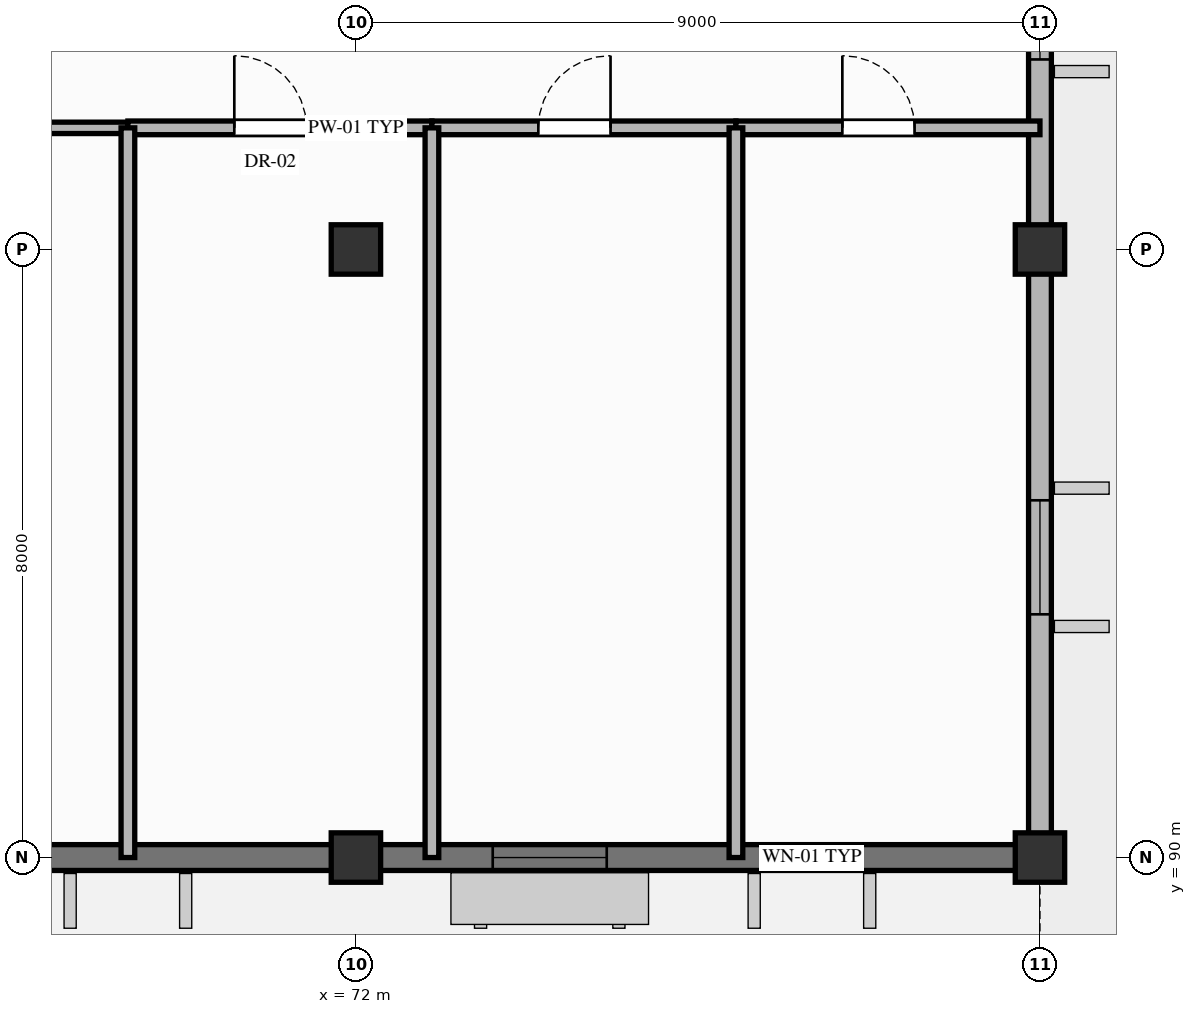
"""IFC4 building model, lengths in metres.
Left out: names, types, materials, properties, quantities, classifications, styles, units other than length and angle.
Written with IfcOpenShell. Run it as: python <this file> out.ifc"""

import sys

from ifc_helpers import new_model, si_unit, direction, frame, frame_2d, origin, origin_2d, place, context, subcontext, project, spatial, rectangle, extrude, element, fill, save


model = new_model("IFC4")
c1 = context("Model", 3, precision=1e-05, world=origin(), true_north=direction((0.0, 1.0)))
c2 = subcontext(c1, "Body", "Model", "MODEL_VIEW")
j1 = project(units=[si_unit("LENGTHUNIT", "METRE"), si_unit("PLANEANGLEUNIT", "RADIAN")], contexts=[c1])
p1 = place(None, origin())
s1 = spatial("IfcSite", under=j1, at=p1, CompositionType="ELEMENT")
p2 = place(p1, origin())
s2 = spatial("IfcBuilding", under=s1, at=p2, CompositionType="ELEMENT")
p3 = place(p2, frame((0.0, 0.0, 16.52)))
s3 = spatial("IfcBuildingStorey", under=s2, at=p3, CompositionType="ELEMENT", Elevation=16.52)
for number, where, z_axis, x_axis in (
    (1, (72.0, 90.0, 0.0), (0.0, 0.0, 1.0), (1.0, 0.0, 0.0)),
    (2, (72.0, 98.0, 0.0), (0.0, 0.0, 1.0), (1.0, 0.0, 0.0)),
    (3, (81.0, 90.0, 0.0), (0.0, 0.0, 1.0), (1.0, 0.0, 0.0)),
    (4, (81.0, 98.0, 0.0), (0.0, 0.0, 1.0), (1.0, 0.0, 0.0)),
):
    element("IfcColumn", number, at=place(p3, frame(where, z_axis=z_axis, x_axis=x_axis)), inside=s3, PredefinedType="COLUMN", context=c2, shape_type="SweptSolid", body=[
        extrude(rectangle(XDim=0.65, YDim=0.65, at=origin_2d()), origin(), (0.0, 0.0, 1.0), 3.74),
    ])
p4 = place(p3, frame((63.0, 90.0, 0.0), z_axis=(0.0, 0.0, 1.0), x_axis=(1.0, 0.0, 0.0)))
e5 = element("IfcWall", 5, at=p4, inside=s3, PredefinedType="SOLIDWALL", context=c2, shape_type="SweptSolid", body=[
    extrude(rectangle(XDim=9.0, YDim=0.34, at=frame_2d((4.5, 0.0))), origin(), (0.0, 0.0, 1.0), 3.46),
])
p5 = place(p4, frame((1.8, 0.0, 0.61)))
e6 = element("IfcOpeningElement", 6, at=p5, cuts=e5, PredefinedType="OPENING", context=c2, shape_type="SweptSolid", body=[
    extrude(rectangle(XDim=1.5, YDim=2.1, at=frame_2d((0.75, 1.05))), frame((0.0, 0.18, 0.0), z_axis=(0.0, -1.0, 0.0), x_axis=(1.0, 0.0, 0.0)), (0.0, 0.0, 1.0), 0.36),
])
p6 = place(p3, frame((72.0, 90.0, 0.0), z_axis=(0.0, 0.0, 1.0), x_axis=(1.0, 0.0, 0.0)))
e7 = element("IfcWall", 7, at=p6, inside=s3, PredefinedType="SOLIDWALL", context=c2, shape_type="SweptSolid", body=[
    extrude(rectangle(XDim=9.0, YDim=0.34, at=frame_2d((4.5, 0.0))), origin(), (0.0, 0.0, 1.0), 3.46),
])
p7 = place(p6, frame((1.8, 0.0, 0.61)))
e8 = element("IfcOpeningElement", 8, at=p7, cuts=e7, PredefinedType="OPENING", context=c2, shape_type="SweptSolid", body=[
    extrude(rectangle(XDim=1.5, YDim=2.1, at=frame_2d((0.75, 1.05))), frame((0.0, 0.18, 0.0), z_axis=(0.0, -1.0, 0.0), x_axis=(1.0, 0.0, 0.0)), (0.0, 0.0, 1.0), 0.36),
])
p8 = place(p6, frame((5.4, 0.0, 0.61)))
e9 = element("IfcOpeningElement", 9, at=p8, cuts=e7, PredefinedType="OPENING", context=c2, shape_type="SweptSolid", body=[
    extrude(rectangle(XDim=1.2, YDim=2.1, at=frame_2d((0.6, 1.05))), frame((0.0, 0.18, 0.0), z_axis=(0.0, -1.0, 0.0), x_axis=(1.0, 0.0, 0.0)), (0.0, 0.0, 1.0), 0.36),
])
p9 = place(p3, frame((81.0, 90.0, 0.0), z_axis=(0.0, 0.0, 1.0), x_axis=(0.0, 1.0, 0.0)))
e10 = element("IfcWall", 10, at=p9, inside=s3, PredefinedType="SOLIDWALL", context=c2, shape_type="SweptSolid", body=[
    extrude(rectangle(XDim=24.0, YDim=0.3, at=frame_2d((12.0, 0.0))), origin(), (0.0, 0.0, 1.0), 2.65),
])
p10 = place(p9, frame((3.2, 0.0, 0.43)))
e11 = element("IfcOpeningElement", 11, at=p10, cuts=e10, PredefinedType="OPENING", context=c2, shape_type="SweptSolid", body=[
    extrude(rectangle(XDim=1.5, YDim=2.1, at=frame_2d((0.75, 1.05))), frame((0.0, 0.16, 0.0), z_axis=(0.0, -1.0, 0.0), x_axis=(1.0, 0.0, 0.0)), (0.0, 0.0, 1.0), 0.32),
])
p11 = place(p9, frame((10.5, 0.0, 0.68)))
e12 = element("IfcOpeningElement", 12, at=p11, cuts=e10, PredefinedType="OPENING", context=c2, shape_type="SweptSolid", body=[
    extrude(rectangle(XDim=1.35, YDim=1.85, at=frame_2d((0.675, 0.925))), frame((0.0, 0.16, 0.0), z_axis=(0.0, -1.0, 0.0), x_axis=(1.0, 0.0, 0.0)), (0.0, 0.0, 1.0), 0.32),
])
p12 = place(p3, frame((54.0, 99.6, 0.0), z_axis=(0.0, 0.0, 1.0), x_axis=(1.0, 0.0, 0.0)))
e13 = element("IfcWall", 13, at=p12, inside=s3, PredefinedType="PARTITIONING", context=c2, shape_type="SweptSolid", body=[
    extrude(rectangle(XDim=15.0, YDim=0.15, at=frame_2d((7.5, 0.0))), origin(), (0.0, 0.0, 1.0), 3.46),
])
p13 = place(p12, frame((6.9, 0.0, 0.0)))
e14 = element("IfcOpeningElement", 14, at=p13, cuts=e13, PredefinedType="OPENING", context=c2, shape_type="SweptSolid", body=[
    extrude(rectangle(XDim=1.6, YDim=2.2, at=frame_2d((0.8, 1.1))), frame((0.0, 0.085, 0.0), z_axis=(0.0, -1.0, 0.0), x_axis=(1.0, 0.0, 0.0)), (0.0, 0.0, 1.0), 0.17),
])
p14 = place(p3, frame((69.0, 99.6, 0.0), z_axis=(0.0, 0.0, 1.0), x_axis=(1.0, 0.0, 0.0)))
e15 = element("IfcWall", 15, at=p14, inside=s3, PredefinedType="PLUMBINGWALL", context=c2, shape_type="SweptSolid", body=[
    extrude(rectangle(XDim=4.0, YDim=0.18, at=frame_2d((2.0, 0.0))), origin(), (0.0, 0.0, 1.0), 3.46),
])
p15 = place(p14, frame((1.4, 0.0, 0.0)))
e16 = element("IfcOpeningElement", 16, at=p15, cuts=e15, PredefinedType="OPENING", context=c2, shape_type="SweptSolid", body=[
    extrude(rectangle(XDim=0.95, YDim=2.15, at=frame_2d((0.475, 1.075))), frame((0.0, 0.1, 0.0), z_axis=(0.0, -1.0, 0.0), x_axis=(1.0, 0.0, 0.0)), (0.0, 0.0, 1.0), 0.2),
])
p16 = place(p3, frame((69.0, 90.0, 0.0), z_axis=(0.0, 0.0, 1.0), x_axis=(0.0, 1.0, 0.0)))
e17 = element("IfcWall", 17, at=p16, inside=s3, PredefinedType="PLUMBINGWALL", context=c2, shape_type="SweptSolid", body=[
    extrude(rectangle(XDim=9.6, YDim=0.18, at=frame_2d((4.8, 0.0))), origin(), (0.0, 0.0, 1.0), 3.46),
])
p17 = place(p3, frame((73.0, 99.6, 0.0), z_axis=(0.0, 0.0, 1.0), x_axis=(1.0, 0.0, 0.0)))
e18 = element("IfcWall", 18, at=p17, inside=s3, PredefinedType="PLUMBINGWALL", context=c2, shape_type="SweptSolid", body=[
    extrude(rectangle(XDim=4.0, YDim=0.18, at=frame_2d((2.0, 0.0))), origin(), (0.0, 0.0, 1.0), 3.46),
])
p18 = place(p17, frame((1.4, 0.0, 0.0)))
e19 = element("IfcOpeningElement", 19, at=p18, cuts=e18, PredefinedType="OPENING", context=c2, shape_type="SweptSolid", body=[
    extrude(rectangle(XDim=0.95, YDim=2.15, at=frame_2d((0.475, 1.075))), frame((0.0, 0.1, 0.0), z_axis=(0.0, -1.0, 0.0), x_axis=(1.0, 0.0, 0.0)), (0.0, 0.0, 1.0), 0.2),
])
p19 = place(p3, frame((73.0, 90.0, 0.0), z_axis=(0.0, 0.0, 1.0), x_axis=(0.0, 1.0, 0.0)))
e20 = element("IfcWall", 20, at=p19, inside=s3, PredefinedType="PLUMBINGWALL", context=c2, shape_type="SweptSolid", body=[
    extrude(rectangle(XDim=9.6, YDim=0.18, at=frame_2d((4.8, 0.0))), origin(), (0.0, 0.0, 1.0), 3.46),
])
p20 = place(p3, frame((77.0, 99.6, 0.0), z_axis=(0.0, 0.0, 1.0), x_axis=(1.0, 0.0, 0.0)))
e21 = element("IfcWall", 21, at=p20, inside=s3, PredefinedType="PLUMBINGWALL", context=c2, shape_type="SweptSolid", body=[
    extrude(rectangle(XDim=4.0, YDim=0.18, at=frame_2d((2.0, 0.0))), origin(), (0.0, 0.0, 1.0), 3.46),
])
p21 = place(p20, frame((1.4, 0.0, 0.0)))
e22 = element("IfcOpeningElement", 22, at=p21, cuts=e21, PredefinedType="OPENING", context=c2, shape_type="SweptSolid", body=[
    extrude(rectangle(XDim=0.95, YDim=2.15, at=frame_2d((0.475, 1.075))), frame((0.0, 0.1, 0.0), z_axis=(0.0, -1.0, 0.0), x_axis=(1.0, 0.0, 0.0)), (0.0, 0.0, 1.0), 0.2),
])
p22 = place(p3, frame((77.0, 90.0, 0.0), z_axis=(0.0, 0.0, 1.0), x_axis=(0.0, 1.0, 0.0)))
e23 = element("IfcWall", 23, at=p22, inside=s3, PredefinedType="PLUMBINGWALL", context=c2, shape_type="SweptSolid", body=[
    extrude(rectangle(XDim=9.6, YDim=0.18, at=frame_2d((4.8, 0.0))), origin(), (0.0, 0.0, 1.0), 3.46),
])
p23 = place(p7, origin())
e24 = element("IfcWindow", 24, at=p23, inside=s3, PartitioningType="SINGLE_PANEL", PredefinedType="WINDOW", context=c2, shape_type="SweptSolid", body=[
    extrude(rectangle(XDim=1.5, YDim=2.1, at=frame_2d((0.75, 1.05))), frame((0.0, 0.03, 0.0), z_axis=(0.0, -1.0, 0.0), x_axis=(1.0, 0.0, 0.0)), (0.0, 0.0, 1.0), 0.06),
])
fill(e8, e24)
p24 = place(p8, origin())
e25 = element("IfcWindow", 25, at=p24, inside=s3, PartitioningType="SINGLE_PANEL", PredefinedType="WINDOW", context=c2, shape_type="SweptSolid", body=[
    extrude(rectangle(XDim=1.2, YDim=2.1, at=frame_2d((0.6, 1.05))), frame((0.0, 0.03, 0.0), z_axis=(0.0, -1.0, 0.0), x_axis=(1.0, 0.0, 0.0)), (0.0, 0.0, 1.0), 0.06),
])
fill(e9, e25)
p25 = place(p10, origin())
e26 = element("IfcWindow", 26, at=p25, inside=s3, PartitioningType="SINGLE_PANEL", PredefinedType="WINDOW", context=c2, shape_type="SweptSolid", body=[
    extrude(rectangle(XDim=1.5, YDim=2.1, at=frame_2d((0.75, 1.05))), frame((0.0, 0.03, 0.0), z_axis=(0.0, -1.0, 0.0), x_axis=(1.0, 0.0, 0.0)), (0.0, 0.0, 1.0), 0.06),
])
fill(e11, e26)
p26 = place(p11, origin())
e27 = element("IfcWindow", 27, at=p26, inside=s3, PartitioningType="SINGLE_PANEL", PredefinedType="WINDOW", context=c2, shape_type="SweptSolid", body=[
    extrude(rectangle(XDim=1.35, YDim=1.85, at=frame_2d((0.675, 0.925))), frame((0.0, 0.03, 0.0), z_axis=(0.0, -1.0, 0.0), x_axis=(1.0, 0.0, 0.0)), (0.0, 0.0, 1.0), 0.06),
])
fill(e12, e27)
p27 = place(p15, origin())
e28 = element("IfcDoor", 28, at=p27, inside=s3, OperationType="SINGLE_SWING_LEFT", PredefinedType="DOOR", context=c2, shape_type="SweptSolid", body=[
    extrude(rectangle(XDim=0.95, YDim=2.15, at=frame_2d((0.475, 1.075))), frame((0.0, 0.025, 0.0), z_axis=(0.0, -1.0, 0.0), x_axis=(1.0, 0.0, 0.0)), (0.0, 0.0, 1.0), 0.05),
])
fill(e16, e28)
p28 = place(p18, origin())
e29 = element("IfcDoor", 29, at=p28, inside=s3, OperationType="SINGLE_SWING_RIGHT", PredefinedType="DOOR", context=c2, shape_type="SweptSolid", body=[
    extrude(rectangle(XDim=0.95, YDim=2.15, at=frame_2d((0.475, 1.075))), frame((0.0, 0.025, 0.0), z_axis=(0.0, -1.0, 0.0), x_axis=(1.0, 0.0, 0.0)), (0.0, 0.0, 1.0), 0.05),
])
fill(e19, e29)
p29 = place(p21, origin())
e30 = element("IfcDoor", 30, at=p29, inside=s3, OperationType="SINGLE_SWING_LEFT", PredefinedType="DOOR", context=c2, shape_type="SweptSolid", body=[
    extrude(rectangle(XDim=0.95, YDim=2.15, at=frame_2d((0.475, 1.075))), frame((0.0, 0.025, 0.0), z_axis=(0.0, -1.0, 0.0), x_axis=(1.0, 0.0, 0.0)), (0.0, 0.0, 1.0), 0.05),
])
fill(e22, e30)
save(model, sys.argv[1])
